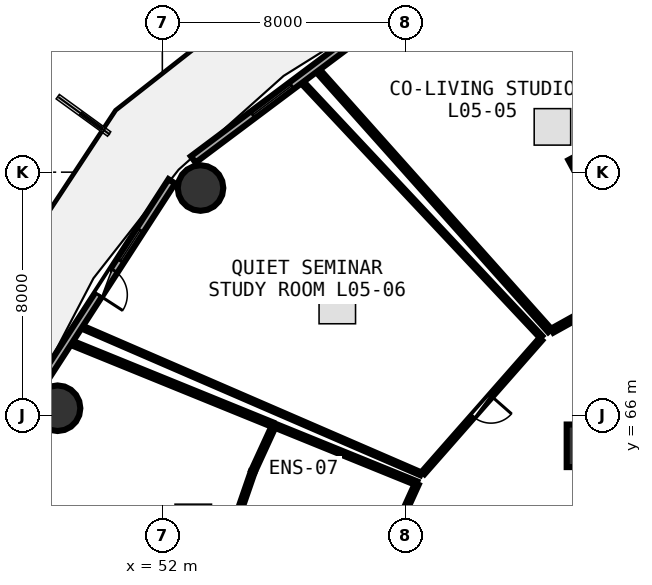
"""IFC4 building model, lengths in metres.
Left out: names, types, materials, properties, quantities, classifications, styles, units other than length and angle.
Written with IfcOpenShell. Run it as: python <this file> out.ifc"""

import sys

from ifc_helpers import new_model, si_unit, direction, frame, frame_2d, origin, origin_2d, place, context, subcontext, project, spatial, rectangle, circle, extrude, element, fill, save


model = new_model("IFC4")
c1 = context("Model", 3, precision=1e-05, world=origin(), true_north=direction((0.0, 1.0)))
c2 = subcontext(c1, "Body", "Model", "MODEL_VIEW")
j1 = project(units=[si_unit("LENGTHUNIT", "METRE"), si_unit("PLANEANGLEUNIT", "RADIAN")], contexts=[c1])
p1 = place(None, origin())
s1 = spatial("IfcSite", under=j1, at=p1, CompositionType="ELEMENT")
p2 = place(p1, origin())
s2 = spatial("IfcBuilding", under=s1, at=p2, CompositionType="ELEMENT")
p3 = place(p2, frame((0.0, 0.0, 22.5)))
s3 = spatial("IfcBuildingStorey", under=s2, at=p3, CompositionType="ELEMENT", Elevation=22.5)
p4 = place(p3, frame((66.0, 65.0, 0.0), z_axis=(0.0, 0.0, 1.0), x_axis=(1.0, 0.0, 0.0)))
e1 = element("IfcColumn", 1, at=p4, inside=s3, PredefinedType="PILASTER", context=c2, shape_type="SweptSolid", body=[
    extrude(rectangle(XDim=1.4, YDim=1.4, at=origin_2d()), origin(), (0.0, 0.0, 1.0), 3.75),
])
for number, where, z_axis, x_axis in (
    (2, (53.256, 73.478, 0.0), (0.0, 0.0, 1.0), (1.0, 0.0, 0.0)),
    (3, (48.553, 66.236, 0.0), (0.0, 0.0, 1.0), (1.0, 0.0, 0.0)),
):
    element("IfcColumn", number, at=place(p3, frame(where, z_axis=z_axis, x_axis=x_axis)), inside=s3, PredefinedType="COLUMN", context=c2, shape_type="SweptSolid", body=[
        extrude(circle(Radius=0.75, at=origin_2d()), origin(), (0.0, 0.0, 1.0), 3.75),
    ])
p5 = place(p3, frame((59.651, 79.389, 0.0), z_axis=(0.0, 0.0, 1.0), x_axis=(-0.80030733173, -0.599590005569, 0.0)))
e4 = element("IfcWall", 4, at=p5, inside=s3, PredefinedType="SOLIDWALL", context=c2, shape_type="SweptSolid", body=[
    extrude(rectangle(XDim=8.291, YDim=0.26, at=frame_2d((4.145, 0.0))), origin(), (0.0, 0.0, 1.0), 3.475),
])
p6 = place(p5, frame((4.245, 0.0, 0.85)))
e5 = element("IfcOpeningElement", 5, at=p6, cuts=e4, PredefinedType="OPENING", context=c2, shape_type="SweptSolid", body=[
    extrude(rectangle(XDim=1.6, YDim=1.45, at=frame_2d((0.8, 0.725))), frame((0.0, 0.14, 0.0), z_axis=(0.0, -1.0, 0.0), x_axis=(1.0, 0.0, 0.0)), (0.0, 0.0, 1.0), 0.28),
])
p7 = place(p3, frame((52.311, 73.698, 0.0), z_axis=(0.0, 0.0, 1.0), x_axis=(-0.543005114258, -0.839729388488, 0.0)))
e6 = element("IfcWall", 6, at=p7, inside=s3, PredefinedType="SOLIDWALL", context=c2, shape_type="SweptSolid", body=[
    extrude(rectangle(XDim=7.938, YDim=0.26, at=frame_2d((3.969, 0.0))), origin(), (0.0, 0.0, 1.0), 3.475),
])
p8 = place(p7, frame((3.494, 0.0, 0.0)))
e7 = element("IfcOpeningElement", 7, at=p8, cuts=e6, PredefinedType="OPENING", context=c2, shape_type="SweptSolid", body=[
    extrude(rectangle(XDim=0.95, YDim=2.1, at=frame_2d((0.475, 1.05))), frame((0.0, 0.14, 0.0), z_axis=(0.0, -1.0, 0.0), x_axis=(1.0, 0.0, 0.0)), (0.0, 0.0, 1.0), 0.28),
])
p9 = place(p7, frame((1.914, 0.0, 0.85)))
e8 = element("IfcOpeningElement", 8, at=p9, cuts=e6, PredefinedType="OPENING", context=c2, shape_type="SweptSolid", body=[
    extrude(rectangle(XDim=1.2, YDim=1.45, at=frame_2d((0.6, 0.725))), frame((0.0, 0.14, 0.0), z_axis=(0.0, -1.0, 0.0), x_axis=(1.0, 0.0, 0.0)), (0.0, 0.0, 1.0), 0.28),
])
p10 = place(p3, frame((67.571, 70.313, 0.0), z_axis=(0.0, 0.0, 1.0), x_axis=(-0.874179278891, -0.48560332408, 0.0)))
e9 = element("IfcWall", 9, at=p10, inside=s3, PredefinedType="PARTITIONING", context=c2, shape_type="SweptSolid", body=[
    extrude(rectangle(XDim=3.14, YDim=0.15, at=frame_2d((1.57, 0.0))), origin(), (0.0, 0.0, 1.0), 3.48),
])
p11 = place(p10, frame((1.095, 0.0, 0.0)))
e10 = element("IfcOpeningElement", 10, at=p11, cuts=e9, PredefinedType="OPENING", context=c2, shape_type="SweptSolid", body=[
    extrude(rectangle(XDim=0.95, YDim=2.08, at=frame_2d((0.475, 1.04))), frame((0.0, 0.085, 0.0), z_axis=(0.0, -1.0, 0.0), x_axis=(1.0, 0.0, 0.0)), (0.0, 0.0, 1.0), 0.17),
])
p12 = place(p3, frame((64.446, 68.507, 0.0), z_axis=(0.0, 0.0, 1.0), x_axis=(-0.660323401664, -0.75098136143, 0.0)))
e11 = element("IfcWall", 11, at=p12, inside=s3, PredefinedType="PARTITIONING", context=c2, shape_type="SweptSolid", body=[
    extrude(rectangle(XDim=5.857, YDim=0.12, at=frame_2d((2.929, 0.0))), origin(), (0.0, 0.0, 1.0), 2.875),
])
p13 = place(p12, frame((2.479, 0.0, 0.0)))
e12 = element("IfcOpeningElement", 12, at=p13, cuts=e11, PredefinedType="OPENING", context=c2, shape_type="SweptSolid", body=[
    extrude(rectangle(XDim=0.9, YDim=2.08, at=frame_2d((0.45, 1.04))), frame((0.0, 0.07, 0.0), z_axis=(0.0, -1.0, 0.0), x_axis=(1.0, 0.0, 0.0)), (0.0, 0.0, 1.0), 0.14),
])
p14 = place(p3, frame((64.746, 68.789, 0.0), z_axis=(0.0, 0.0, 1.0), x_axis=(-0.66580890104, 0.746122313897, 0.0)))
e13 = element("IfcWall", 13, at=p14, inside=s3, PredefinedType="PARTITIONING", context=c2, shape_type="SweptSolid", body=[
    extrude(rectangle(XDim=11.399, YDim=0.15, at=frame_2d((5.7, 0.0))), origin(), (0.0, 0.0, 1.0), 2.875),
])
p15 = place(p3, frame((65.423, 74.434, 0.0), z_axis=(0.0, 0.0, 1.0), x_axis=(0.473660949034, -0.880707275637, 0.0)))
e14 = element("IfcWall", 14, at=p15, inside=s3, PredefinedType="PARTITIONING", context=c2, shape_type="SweptSolid", body=[
    extrude(rectangle(XDim=1.891, YDim=0.15, at=frame_2d((0.946, 0.0))), origin(), (0.0, 0.0, 1.0), 3.175),
])
p16 = place(p3, frame((60.502, 64.079, 0.0), z_axis=(0.0, 0.0, 1.0), x_axis=(-0.917695041134, 0.397285554077, 0.0)))
e15 = element("IfcWall", 15, at=p16, inside=s3, PredefinedType="PARTITIONING", context=c2, shape_type="SweptSolid", body=[
    extrude(rectangle(XDim=12.07, YDim=0.1, at=frame_2d((6.035, 0.0))), origin(), (0.0, 0.0, 1.0), 2.875),
])
p17 = place(p3, frame((56.632, 76.922, 0.0), z_axis=(0.0, 0.0, 1.0), x_axis=(0.684261294523, -0.729236916796, 0.0)))
e16 = element("IfcWall", 16, at=p17, inside=s3, PredefinedType="PARTITIONING", context=c2, shape_type="SweptSolid", body=[
    extrude(rectangle(XDim=11.438, YDim=0.1, at=frame_2d((5.719, 0.0))), origin(), (0.0, 0.0, 1.0), 2.875),
])
p18 = place(p3, frame((60.372, 63.745, 0.0), z_axis=(0.0, 0.0, 1.0), x_axis=(-0.4138937247, -0.910325208183, 0.0)))
e17 = element("IfcWall", 17, at=p18, inside=s3, PredefinedType="PLUMBINGWALL", context=c2, shape_type="SweptSolid", body=[
    extrude(rectangle(XDim=1.216, YDim=0.13, at=frame_2d((0.608, 0.0))), origin(), (0.0, 0.0, 1.0), 3.48),
])
p19 = place(p3, frame((54.441, 62.598, 0.0), z_axis=(0.0, 0.0, 1.0), x_axis=(0.326356647952, 0.945246707657, 0.0)))
e18 = element("IfcWall", 18, at=p19, inside=s3, PredefinedType="PLUMBINGWALL", context=c2, shape_type="SweptSolid", body=[
    extrude(rectangle(XDim=1.624, YDim=0.13, at=frame_2d((0.812, 0.0))), origin(), (0.0, 0.0, 1.0), 3.48),
])
p20 = place(p3, frame((54.986, 64.17, 0.0), z_axis=(0.0, 0.0, 1.0), x_axis=(0.41762687648, 0.908618617486, 0.0)))
e19 = element("IfcWall", 19, at=p20, inside=s3, PredefinedType="PLUMBINGWALL", context=c2, shape_type="SweptSolid", body=[
    extrude(rectangle(XDim=1.634, YDim=0.13, at=frame_2d((0.817, 0.0))), origin(), (0.0, 0.0, 1.0), 2.875),
])
p21 = place(p3, frame((55.696, 65.666, 0.0), z_axis=(0.0, 0.0, 1.0), x_axis=(0.926504606816, -0.376283421835, 0.0)))
e20 = element("IfcWall", 20, at=p21, inside=s3, PredefinedType="PLUMBINGWALL", context=c2, shape_type="SweptSolid", body=[
    extrude(rectangle(XDim=5.036, YDim=0.13, at=frame_2d((2.518, 0.0))), origin(), (0.0, 0.0, 1.0), 2.875),
])
p22 = place(p3, frame((49.135, 68.336, 0.0), z_axis=(0.0, 0.0, 1.0), x_axis=(0.926325178802, -0.376724917038, 0.0)))
e21 = element("IfcWall", 21, at=p22, inside=s3, PredefinedType="PARTITIONING", context=c2, shape_type="SweptSolid", body=[
    extrude(rectangle(XDim=6.983, YDim=0.15, at=frame_2d((3.492, 0.0))), origin(), (0.0, 0.0, 1.0), 2.875),
])
p23 = place(p6, origin())
e22 = element("IfcWindow", 22, at=p23, inside=s3, PartitioningType="SINGLE_PANEL", PredefinedType="WINDOW", context=c2, shape_type="SweptSolid", body=[
    extrude(rectangle(XDim=1.6, YDim=1.45, at=frame_2d((0.8, 0.725))), frame((0.0, 0.03, 0.0), z_axis=(0.0, -1.0, 0.0), x_axis=(1.0, 0.0, 0.0)), (0.0, 0.0, 1.0), 0.06),
])
fill(e5, e22)
p24 = place(p8, frame((0.95, 0.0, 0.0), z_axis=(0.0, 0.0, 1.0), x_axis=(-1.0, 0.0, 0.0)))
e23 = element("IfcDoor", 23, at=p24, inside=s3, OperationType="SINGLE_SWING_LEFT", PredefinedType="DOOR", context=c2, shape_type="SweptSolid", body=[
    extrude(rectangle(XDim=0.95, YDim=2.1, at=frame_2d((0.475, 1.05))), frame((0.0, 0.025, 0.0), z_axis=(0.0, -1.0, 0.0), x_axis=(1.0, 0.0, 0.0)), (0.0, 0.0, 1.0), 0.05),
])
fill(e7, e23)
p25 = place(p9, origin())
e24 = element("IfcWindow", 24, at=p25, inside=s3, PartitioningType="SINGLE_PANEL", PredefinedType="WINDOW", context=c2, shape_type="SweptSolid", body=[
    extrude(rectangle(XDim=1.2, YDim=1.45, at=frame_2d((0.6, 0.725))), frame((0.0, 0.03, 0.0), z_axis=(0.0, -1.0, 0.0), x_axis=(1.0, 0.0, 0.0)), (0.0, 0.0, 1.0), 0.06),
])
fill(e8, e24)
p26 = place(p13, origin())
e25 = element("IfcDoor", 25, at=p26, inside=s3, OperationType="SINGLE_SWING_LEFT", PredefinedType="DOOR", context=c2, shape_type="SweptSolid", body=[
    extrude(rectangle(XDim=0.9, YDim=2.08, at=frame_2d((0.45, 1.04))), frame((0.0, 0.025, 0.0), z_axis=(0.0, -1.0, 0.0), x_axis=(1.0, 0.0, 0.0)), (0.0, 0.0, 1.0), 0.05),
])
fill(e12, e25)
save(model, sys.argv[1])
